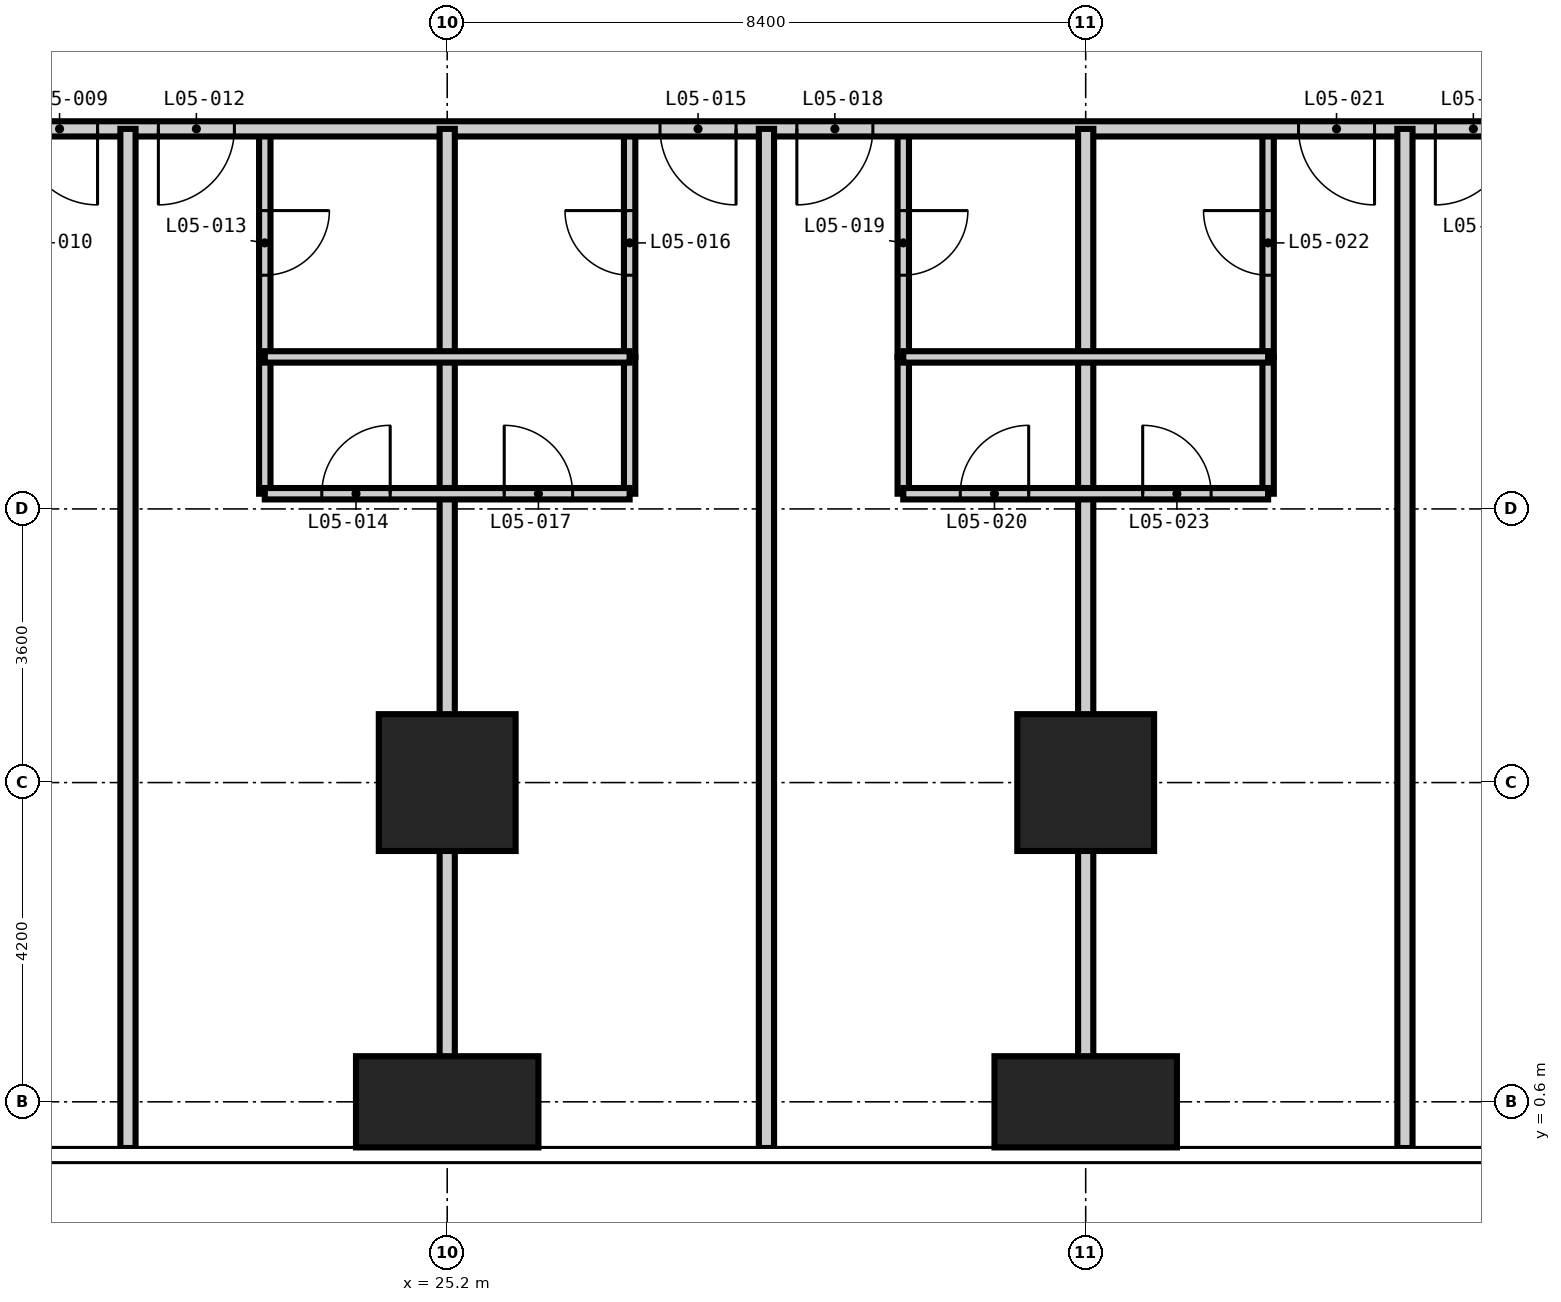
"""IFC4 building model, lengths in metres.
Left out: names, types, materials, properties, quantities, classifications, styles, units other than length and angle.
Written with IfcOpenShell. Run it as: python <this file> out.ifc"""

import sys

from ifc_helpers import new_model, si_unit, direction, frame, frame_2d, origin, origin_2d, place, context, subcontext, project, spatial, rectangle, extrude, element, fill, save


model = new_model("IFC4")
c1 = context("Model", 3, precision=1e-05, world=origin(), true_north=direction((0.0, 1.0)))
c2 = subcontext(c1, "Body", "Model", "MODEL_VIEW")
j1 = project(units=[si_unit("LENGTHUNIT", "METRE"), si_unit("PLANEANGLEUNIT", "RADIAN")], contexts=[c1])
p1 = place(None, origin())
s1 = spatial("IfcSite", under=j1, at=p1, CompositionType="ELEMENT")
p2 = place(p1, origin())
s2 = spatial("IfcBuilding", under=s1, at=p2, CompositionType="ELEMENT")
p3 = place(p2, frame((0.0, 0.0, 27.0)))
s3 = spatial("IfcBuildingStorey", under=s2, at=p3, CompositionType="ELEMENT", Elevation=27.0)
p4 = place(p3, frame((25.2, 0.6, -0.35), z_axis=(0.0, 0.0, 1.0), x_axis=(1.0, 0.0, 0.0)))
e1 = element("IfcColumn", 1, at=p4, inside=s3, PredefinedType="COLUMN", context=c2, shape_type="SweptSolid", body=[
    extrude(rectangle(XDim=2.4, YDim=1.2, at=origin_2d()), origin(), (0.0, 0.0, 1.0), 3.6),
])
p5 = place(p3, frame((25.2, 4.8, -0.35), z_axis=(0.0, 0.0, 1.0), x_axis=(1.0, 0.0, 0.0)))
e2 = element("IfcColumn", 2, at=p5, inside=s3, PredefinedType="COLUMN", context=c2, shape_type="SweptSolid", body=[
    extrude(rectangle(XDim=1.8, YDim=1.8, at=origin_2d()), origin(), (0.0, 0.0, 1.0), 3.6),
])
p6 = place(p3, frame((33.6, 0.6, -0.35), z_axis=(0.0, 0.0, 1.0), x_axis=(1.0, 0.0, 0.0)))
e3 = element("IfcColumn", 3, at=p6, inside=s3, PredefinedType="COLUMN", context=c2, shape_type="SweptSolid", body=[
    extrude(rectangle(XDim=2.4, YDim=1.2, at=origin_2d()), origin(), (0.0, 0.0, 1.0), 3.6),
])
p7 = place(p3, frame((33.6, 4.8, -0.35), z_axis=(0.0, 0.0, 1.0), x_axis=(1.0, 0.0, 0.0)))
e4 = element("IfcColumn", 4, at=p7, inside=s3, PredefinedType="COLUMN", context=c2, shape_type="SweptSolid", body=[
    extrude(rectangle(XDim=1.8, YDim=1.8, at=origin_2d()), origin(), (0.0, 0.0, 1.0), 3.6),
])
p8 = place(p3, frame((22.8, 10.4, 0.0), z_axis=(0.0, 0.0, 1.0), x_axis=(0.0, 1.0, 0.0)))
e5 = element("IfcWall", 5, at=p8, inside=s3, PredefinedType="PARTITIONING", context=c2, shape_type="SweptSolid", body=[
    extrude(rectangle(XDim=3.0, YDim=0.15, at=frame_2d((1.5, 0.0))), origin(), (0.0, 0.0, 1.0), 3.25),
])
p9 = place(p8, frame((1.075, 0.0, 0.0)))
e6 = element("IfcOpeningElement", 6, at=p9, cuts=e5, PredefinedType="OPENING", context=c2, shape_type="SweptSolid", body=[
    extrude(rectangle(XDim=0.85, YDim=2.1, at=frame_2d((0.425, 1.05))), frame((0.0, 0.085, 0.0), z_axis=(0.0, -1.0, 0.0), x_axis=(1.0, 0.0, 0.0)), (0.0, 0.0, 1.0), 0.17),
])
p10 = place(p3, frame((27.6, 10.4, 0.0), z_axis=(0.0, 0.0, 1.0), x_axis=(0.0, 1.0, 0.0)))
e7 = element("IfcWall", 7, at=p10, inside=s3, PredefinedType="PARTITIONING", context=c2, shape_type="SweptSolid", body=[
    extrude(rectangle(XDim=3.0, YDim=0.15, at=frame_2d((1.5, 0.0))), origin(), (0.0, 0.0, 1.0), 3.25),
])
p11 = place(p10, frame((1.075, 0.0, 0.0)))
e8 = element("IfcOpeningElement", 8, at=p11, cuts=e7, PredefinedType="OPENING", context=c2, shape_type="SweptSolid", body=[
    extrude(rectangle(XDim=0.85, YDim=2.1, at=frame_2d((0.425, 1.05))), frame((0.0, 0.085, 0.0), z_axis=(0.0, -1.0, 0.0), x_axis=(1.0, 0.0, 0.0)), (0.0, 0.0, 1.0), 0.17),
])
p12 = place(p3, frame((31.2, 10.4, 0.0), z_axis=(0.0, 0.0, 1.0), x_axis=(0.0, 1.0, 0.0)))
e9 = element("IfcWall", 9, at=p12, inside=s3, PredefinedType="PARTITIONING", context=c2, shape_type="SweptSolid", body=[
    extrude(rectangle(XDim=3.0, YDim=0.15, at=frame_2d((1.5, 0.0))), origin(), (0.0, 0.0, 1.0), 3.25),
])
p13 = place(p12, frame((1.075, 0.0, 0.0)))
e10 = element("IfcOpeningElement", 10, at=p13, cuts=e9, PredefinedType="OPENING", context=c2, shape_type="SweptSolid", body=[
    extrude(rectangle(XDim=0.85, YDim=2.1, at=frame_2d((0.425, 1.05))), frame((0.0, 0.085, 0.0), z_axis=(0.0, -1.0, 0.0), x_axis=(1.0, 0.0, 0.0)), (0.0, 0.0, 1.0), 0.17),
])
p14 = place(p3, frame((36.0, 10.4, 0.0), z_axis=(0.0, 0.0, 1.0), x_axis=(0.0, 1.0, 0.0)))
e11 = element("IfcWall", 11, at=p14, inside=s3, PredefinedType="PARTITIONING", context=c2, shape_type="SweptSolid", body=[
    extrude(rectangle(XDim=3.0, YDim=0.15, at=frame_2d((1.5, 0.0))), origin(), (0.0, 0.0, 1.0), 3.25),
])
p15 = place(p14, frame((1.075, 0.0, 0.0)))
e12 = element("IfcOpeningElement", 12, at=p15, cuts=e11, PredefinedType="OPENING", context=c2, shape_type="SweptSolid", body=[
    extrude(rectangle(XDim=0.85, YDim=2.1, at=frame_2d((0.425, 1.05))), frame((0.0, 0.085, 0.0), z_axis=(0.0, -1.0, 0.0), x_axis=(1.0, 0.0, 0.0)), (0.0, 0.0, 1.0), 0.17),
])
p16 = place(p3, frame((45.7, 13.4, 0.0), z_axis=(0.0, 0.0, 1.0), x_axis=(-1.0, 0.0, 0.0)))
e13 = element("IfcWall", 13, at=p16, inside=s3, PredefinedType="PARTITIONING", context=c2, shape_type="SweptSolid", body=[
    extrude(rectangle(XDim=32.3, YDim=0.2, at=frame_2d((16.15, 0.0))), origin(), (0.0, 0.0, 1.0), 3.25),
])
p17 = place(p16, frame((25.1, 0.0, 0.0)))
e14 = element("IfcOpeningElement", 14, at=p17, cuts=e13, PredefinedType="OPENING", context=c2, shape_type="SweptSolid", body=[
    extrude(rectangle(XDim=1.0, YDim=2.2, at=frame_2d((0.5, 1.1))), frame((0.0, 0.11, 0.0), z_axis=(0.0, -1.0, 0.0), x_axis=(1.0, 0.0, 0.0)), (0.0, 0.0, 1.0), 0.22),
])
p18 = place(p16, frame((23.3, 0.0, 0.0)))
e15 = element("IfcOpeningElement", 15, at=p18, cuts=e13, PredefinedType="OPENING", context=c2, shape_type="SweptSolid", body=[
    extrude(rectangle(XDim=1.0, YDim=2.2, at=frame_2d((0.5, 1.1))), frame((0.0, 0.11, 0.0), z_axis=(0.0, -1.0, 0.0), x_axis=(1.0, 0.0, 0.0)), (0.0, 0.0, 1.0), 0.22),
])
p19 = place(p16, frame((16.7, 0.0, 0.0)))
e16 = element("IfcOpeningElement", 16, at=p19, cuts=e13, PredefinedType="OPENING", context=c2, shape_type="SweptSolid", body=[
    extrude(rectangle(XDim=1.0, YDim=2.2, at=frame_2d((0.5, 1.1))), frame((0.0, 0.11, 0.0), z_axis=(0.0, -1.0, 0.0), x_axis=(1.0, 0.0, 0.0)), (0.0, 0.0, 1.0), 0.22),
])
p20 = place(p16, frame((14.9, 0.0, 0.0)))
e17 = element("IfcOpeningElement", 17, at=p20, cuts=e13, PredefinedType="OPENING", context=c2, shape_type="SweptSolid", body=[
    extrude(rectangle(XDim=1.0, YDim=2.2, at=frame_2d((0.5, 1.1))), frame((0.0, 0.11, 0.0), z_axis=(0.0, -1.0, 0.0), x_axis=(1.0, 0.0, 0.0)), (0.0, 0.0, 1.0), 0.22),
])
p21 = place(p16, frame((8.3, 0.0, 0.0)))
e18 = element("IfcOpeningElement", 18, at=p21, cuts=e13, PredefinedType="OPENING", context=c2, shape_type="SweptSolid", body=[
    extrude(rectangle(XDim=1.0, YDim=2.2, at=frame_2d((0.5, 1.1))), frame((0.0, 0.11, 0.0), z_axis=(0.0, -1.0, 0.0), x_axis=(1.0, 0.0, 0.0)), (0.0, 0.0, 1.0), 0.22),
])
p22 = place(p16, frame((6.5, 0.0, 0.0)))
e19 = element("IfcOpeningElement", 19, at=p22, cuts=e13, PredefinedType="OPENING", context=c2, shape_type="SweptSolid", body=[
    extrude(rectangle(XDim=1.0, YDim=2.2, at=frame_2d((0.5, 1.1))), frame((0.0, 0.11, 0.0), z_axis=(0.0, -1.0, 0.0), x_axis=(1.0, 0.0, 0.0)), (0.0, 0.0, 1.0), 0.22),
])
for number, where, z_axis, x_axis in (
    (20, (21.0, -0.008, 0.0), (0.0, 0.0, 1.0), (0.0, 1.0, 0.0)),
    (21, (25.2, -0.008, 0.0), (0.0, 0.0, 1.0), (0.0, 1.0, 0.0)),
    (22, (29.4, -0.008, 0.0), (0.0, 0.0, 1.0), (0.0, 1.0, 0.0)),
    (23, (33.6, -0.008, 0.0), (0.0, 0.0, 1.0), (0.0, 1.0, 0.0)),
    (24, (37.8, -0.008, 0.0), (0.0, 0.0, 1.0), (0.0, 1.0, 0.0)),
):
    element("IfcWall", number, at=place(p3, frame(where, z_axis=z_axis, x_axis=x_axis)), inside=s3, PredefinedType="PARTITIONING", context=c2, shape_type="SweptSolid", body=[
        extrude(rectangle(XDim=13.408, YDim=0.2, at=frame_2d((6.704, 0.0))), origin(), (0.0, 0.0, 1.0), 3.25),
    ])
for number, where, z_axis, x_axis in (
    (25, (22.8, 8.6, 0.0), (0.0, 0.0, 1.0), (0.0, 1.0, 0.0)),
    (26, (27.6, 8.6, 0.0), (0.0, 0.0, 1.0), (0.0, 1.0, 0.0)),
    (27, (31.2, 8.6, 0.0), (0.0, 0.0, 1.0), (0.0, 1.0, 0.0)),
    (28, (36.0, 8.6, 0.0), (0.0, 0.0, 1.0), (0.0, 1.0, 0.0)),
):
    element("IfcWall", number, at=place(p3, frame(where, z_axis=z_axis, x_axis=x_axis)), inside=s3, PredefinedType="PARTITIONING", context=c2, shape_type="SweptSolid", body=[
        extrude(rectangle(XDim=1.8, YDim=0.15, at=frame_2d((0.9, 0.0))), origin(), (0.0, 0.0, 1.0), 3.25),
    ])
p23 = place(p3, frame((22.8, 8.6, 0.0), z_axis=(0.0, 0.0, 1.0), x_axis=(1.0, 0.0, 0.0)))
e29 = element("IfcWall", 29, at=p23, inside=s3, PredefinedType="PARTITIONING", context=c2, shape_type="SweptSolid", body=[
    extrude(rectangle(XDim=4.8, YDim=0.15, at=frame_2d((2.4, 0.0))), origin(), (0.0, 0.0, 1.0), 3.25),
])
p24 = place(p23, frame((0.75, 0.0, 0.0)))
e30 = element("IfcOpeningElement", 30, at=p24, cuts=e29, PredefinedType="OPENING", context=c2, shape_type="SweptSolid", body=[
    extrude(rectangle(XDim=0.9, YDim=2.1, at=frame_2d((0.45, 1.05))), frame((0.0, 0.085, 0.0), z_axis=(0.0, -1.0, 0.0), x_axis=(1.0, 0.0, 0.0)), (0.0, 0.0, 1.0), 0.17),
])
p25 = place(p23, frame((3.15, 0.0, 0.0)))
e31 = element("IfcOpeningElement", 31, at=p25, cuts=e29, PredefinedType="OPENING", context=c2, shape_type="SweptSolid", body=[
    extrude(rectangle(XDim=0.9, YDim=2.1, at=frame_2d((0.45, 1.05))), frame((0.0, 0.085, 0.0), z_axis=(0.0, -1.0, 0.0), x_axis=(1.0, 0.0, 0.0)), (0.0, 0.0, 1.0), 0.17),
])
p26 = place(p3, frame((31.2, 8.6, 0.0), z_axis=(0.0, 0.0, 1.0), x_axis=(1.0, 0.0, 0.0)))
e32 = element("IfcWall", 32, at=p26, inside=s3, PredefinedType="PARTITIONING", context=c2, shape_type="SweptSolid", body=[
    extrude(rectangle(XDim=4.8, YDim=0.15, at=frame_2d((2.4, 0.0))), origin(), (0.0, 0.0, 1.0), 3.25),
])
p27 = place(p26, frame((0.75, 0.0, 0.0)))
e33 = element("IfcOpeningElement", 33, at=p27, cuts=e32, PredefinedType="OPENING", context=c2, shape_type="SweptSolid", body=[
    extrude(rectangle(XDim=0.9, YDim=2.1, at=frame_2d((0.45, 1.05))), frame((0.0, 0.085, 0.0), z_axis=(0.0, -1.0, 0.0), x_axis=(1.0, 0.0, 0.0)), (0.0, 0.0, 1.0), 0.17),
])
p28 = place(p26, frame((3.15, 0.0, 0.0)))
e34 = element("IfcOpeningElement", 34, at=p28, cuts=e32, PredefinedType="OPENING", context=c2, shape_type="SweptSolid", body=[
    extrude(rectangle(XDim=0.9, YDim=2.1, at=frame_2d((0.45, 1.05))), frame((0.0, 0.085, 0.0), z_axis=(0.0, -1.0, 0.0), x_axis=(1.0, 0.0, 0.0)), (0.0, 0.0, 1.0), 0.17),
])
for number, where, z_axis, x_axis in (
    (35, (22.8, 10.4, 0.0), (0.0, 0.0, 1.0), (1.0, 0.0, 0.0)),
    (36, (31.2, 10.4, 0.0), (0.0, 0.0, 1.0), (1.0, 0.0, 0.0)),
):
    element("IfcWall", number, at=place(p3, frame(where, z_axis=z_axis, x_axis=x_axis)), inside=s3, PredefinedType="PARTITIONING", context=c2, shape_type="SweptSolid", body=[
        extrude(rectangle(XDim=4.8, YDim=0.15, at=frame_2d((2.4, 0.0))), origin(), (0.0, 0.0, 1.0), 3.25),
    ])
p29 = place(p17, origin())
e37 = element("IfcDoor", 37, at=p29, inside=s3, OperationType="SINGLE_SWING_LEFT", PredefinedType="DOOR", context=c2, shape_type="SweptSolid", body=[
    extrude(rectangle(XDim=1.0, YDim=2.2, at=frame_2d((0.5, 1.1))), frame((0.0, 0.025, 0.0), z_axis=(0.0, -1.0, 0.0), x_axis=(1.0, 0.0, 0.0)), (0.0, 0.0, 1.0), 0.05),
])
fill(e14, e37)
p30 = place(p18, origin())
e38 = element("IfcDoor", 38, at=p30, inside=s3, OperationType="SINGLE_SWING_RIGHT", PredefinedType="DOOR", context=c2, shape_type="SweptSolid", body=[
    extrude(rectangle(XDim=1.0, YDim=2.2, at=frame_2d((0.5, 1.1))), frame((0.0, 0.025, 0.0), z_axis=(0.0, -1.0, 0.0), x_axis=(1.0, 0.0, 0.0)), (0.0, 0.0, 1.0), 0.05),
])
fill(e15, e38)
p31 = place(p9, frame((0.85, 0.0, 0.0), z_axis=(0.0, 0.0, 1.0), x_axis=(-1.0, 0.0, 0.0)))
e39 = element("IfcDoor", 39, at=p31, inside=s3, OperationType="SINGLE_SWING_LEFT", PredefinedType="DOOR", context=c2, shape_type="SweptSolid", body=[
    extrude(rectangle(XDim=0.85, YDim=2.1, at=frame_2d((0.425, 1.05))), frame((0.0, 0.025, 0.0), z_axis=(0.0, -1.0, 0.0), x_axis=(1.0, 0.0, 0.0)), (0.0, 0.0, 1.0), 0.05),
])
fill(e6, e39)
p32 = place(p24, origin())
e40 = element("IfcDoor", 40, at=p32, inside=s3, OperationType="SINGLE_SWING_RIGHT", PredefinedType="DOOR", context=c2, shape_type="SweptSolid", body=[
    extrude(rectangle(XDim=0.9, YDim=2.1, at=frame_2d((0.45, 1.05))), frame((0.0, 0.025, 0.0), z_axis=(0.0, -1.0, 0.0), x_axis=(1.0, 0.0, 0.0)), (0.0, 0.0, 1.0), 0.05),
])
fill(e30, e40)
p33 = place(p19, origin())
e41 = element("IfcDoor", 41, at=p33, inside=s3, OperationType="SINGLE_SWING_LEFT", PredefinedType="DOOR", context=c2, shape_type="SweptSolid", body=[
    extrude(rectangle(XDim=1.0, YDim=2.2, at=frame_2d((0.5, 1.1))), frame((0.0, 0.025, 0.0), z_axis=(0.0, -1.0, 0.0), x_axis=(1.0, 0.0, 0.0)), (0.0, 0.0, 1.0), 0.05),
])
fill(e16, e41)
p34 = place(p11, origin())
e42 = element("IfcDoor", 42, at=p34, inside=s3, OperationType="SINGLE_SWING_RIGHT", PredefinedType="DOOR", context=c2, shape_type="SweptSolid", body=[
    extrude(rectangle(XDim=0.85, YDim=2.1, at=frame_2d((0.425, 1.05))), frame((0.0, 0.025, 0.0), z_axis=(0.0, -1.0, 0.0), x_axis=(1.0, 0.0, 0.0)), (0.0, 0.0, 1.0), 0.05),
])
fill(e8, e42)
p35 = place(p25, origin())
e43 = element("IfcDoor", 43, at=p35, inside=s3, OperationType="SINGLE_SWING_LEFT", PredefinedType="DOOR", context=c2, shape_type="SweptSolid", body=[
    extrude(rectangle(XDim=0.9, YDim=2.1, at=frame_2d((0.45, 1.05))), frame((0.0, 0.025, 0.0), z_axis=(0.0, -1.0, 0.0), x_axis=(1.0, 0.0, 0.0)), (0.0, 0.0, 1.0), 0.05),
])
fill(e31, e43)
p36 = place(p20, origin())
e44 = element("IfcDoor", 44, at=p36, inside=s3, OperationType="SINGLE_SWING_RIGHT", PredefinedType="DOOR", context=c2, shape_type="SweptSolid", body=[
    extrude(rectangle(XDim=1.0, YDim=2.2, at=frame_2d((0.5, 1.1))), frame((0.0, 0.025, 0.0), z_axis=(0.0, -1.0, 0.0), x_axis=(1.0, 0.0, 0.0)), (0.0, 0.0, 1.0), 0.05),
])
fill(e17, e44)
p37 = place(p13, frame((0.85, 0.0, 0.0), z_axis=(0.0, 0.0, 1.0), x_axis=(-1.0, 0.0, 0.0)))
e45 = element("IfcDoor", 45, at=p37, inside=s3, OperationType="SINGLE_SWING_LEFT", PredefinedType="DOOR", context=c2, shape_type="SweptSolid", body=[
    extrude(rectangle(XDim=0.85, YDim=2.1, at=frame_2d((0.425, 1.05))), frame((0.0, 0.025, 0.0), z_axis=(0.0, -1.0, 0.0), x_axis=(1.0, 0.0, 0.0)), (0.0, 0.0, 1.0), 0.05),
])
fill(e10, e45)
p38 = place(p27, origin())
e46 = element("IfcDoor", 46, at=p38, inside=s3, OperationType="SINGLE_SWING_RIGHT", PredefinedType="DOOR", context=c2, shape_type="SweptSolid", body=[
    extrude(rectangle(XDim=0.9, YDim=2.1, at=frame_2d((0.45, 1.05))), frame((0.0, 0.025, 0.0), z_axis=(0.0, -1.0, 0.0), x_axis=(1.0, 0.0, 0.0)), (0.0, 0.0, 1.0), 0.05),
])
fill(e33, e46)
p39 = place(p21, origin())
e47 = element("IfcDoor", 47, at=p39, inside=s3, OperationType="SINGLE_SWING_LEFT", PredefinedType="DOOR", context=c2, shape_type="SweptSolid", body=[
    extrude(rectangle(XDim=1.0, YDim=2.2, at=frame_2d((0.5, 1.1))), frame((0.0, 0.025, 0.0), z_axis=(0.0, -1.0, 0.0), x_axis=(1.0, 0.0, 0.0)), (0.0, 0.0, 1.0), 0.05),
])
fill(e18, e47)
p40 = place(p15, origin())
e48 = element("IfcDoor", 48, at=p40, inside=s3, OperationType="SINGLE_SWING_RIGHT", PredefinedType="DOOR", context=c2, shape_type="SweptSolid", body=[
    extrude(rectangle(XDim=0.85, YDim=2.1, at=frame_2d((0.425, 1.05))), frame((0.0, 0.025, 0.0), z_axis=(0.0, -1.0, 0.0), x_axis=(1.0, 0.0, 0.0)), (0.0, 0.0, 1.0), 0.05),
])
fill(e12, e48)
p41 = place(p28, origin())
e49 = element("IfcDoor", 49, at=p41, inside=s3, OperationType="SINGLE_SWING_LEFT", PredefinedType="DOOR", context=c2, shape_type="SweptSolid", body=[
    extrude(rectangle(XDim=0.9, YDim=2.1, at=frame_2d((0.45, 1.05))), frame((0.0, 0.025, 0.0), z_axis=(0.0, -1.0, 0.0), x_axis=(1.0, 0.0, 0.0)), (0.0, 0.0, 1.0), 0.05),
])
fill(e34, e49)
p42 = place(p22, origin())
e50 = element("IfcDoor", 50, at=p42, inside=s3, OperationType="SINGLE_SWING_RIGHT", PredefinedType="DOOR", context=c2, shape_type="SweptSolid", body=[
    extrude(rectangle(XDim=1.0, YDim=2.2, at=frame_2d((0.5, 1.1))), frame((0.0, 0.025, 0.0), z_axis=(0.0, -1.0, 0.0), x_axis=(1.0, 0.0, 0.0)), (0.0, 0.0, 1.0), 0.05),
])
fill(e19, e50)
save(model, sys.argv[1])
